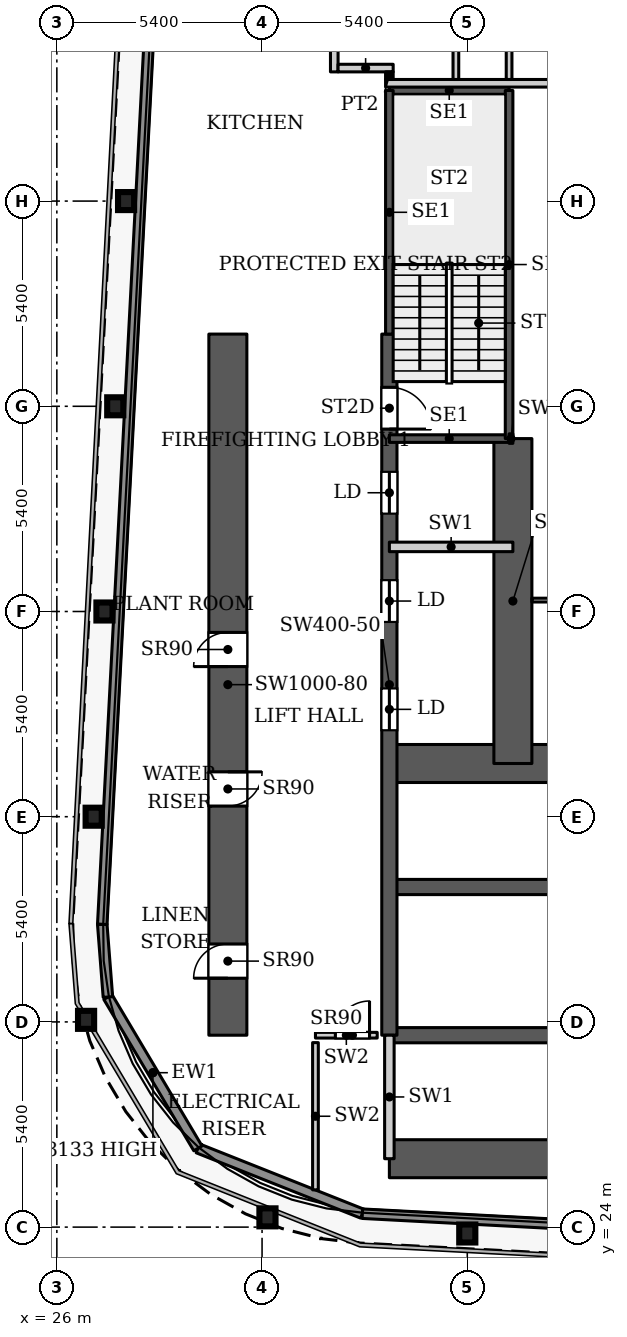
"""IFC4 building model, lengths in metres.
Left out: names, types, materials, properties, quantities, classifications, styles, units other than length and angle.
Written with IfcOpenShell. Run it as: python <this file> out.ifc"""

import sys

from ifc_helpers import new_model, si_unit, direction, frame, frame_2d, origin, origin_2d, place, context, subcontext, project, spatial, rectangle, i_section, extrude, source, transform, mapped, element, fill, save


model = new_model("IFC4")
c1 = context("Model", 3, precision=1e-05, world=origin(), true_north=direction((0.0, 1.0)))
c2 = subcontext(c1, "Body", "Model", "MODEL_VIEW")
j1 = project(units=[si_unit("LENGTHUNIT", "METRE"), si_unit("PLANEANGLEUNIT", "RADIAN")], contexts=[c1])
p1 = place(None, origin())
s1 = spatial("IfcSite", under=j1, at=p1, CompositionType="ELEMENT")
p2 = place(p1, origin())
s2 = spatial("IfcBuilding", under=s1, at=p2, CompositionType="ELEMENT")
p3 = place(p2, frame((0.0, 0.0, 53.9)))
s3 = spatial("IfcBuildingStorey", under=s2, at=p3, CompositionType="ELEMENT", Elevation=53.9)
for number, where, z_axis, x_axis in (
    (1, (36.8, 23.832, 0.0), (0.0, 0.0, 1.0), (1.0, 0.0, 0.0)),
    (2, (31.542, 24.257, 0.0), (0.0, 0.0, 1.0), (1.0, 0.0, 0.0)),
    (3, (26.769, 29.454, 0.0), (0.0, 0.0, 1.0), (1.0, 0.0, 0.0)),
    (4, (26.969, 34.8, 0.0), (0.0, 0.0, 1.0), (1.0, 0.0, 0.0)),
    (5, (27.253, 40.2, 0.0), (0.0, 0.0, 1.0), (1.0, 0.0, 0.0)),
    (6, (27.537, 45.6, 0.0), (0.0, 0.0, 1.0), (1.0, 0.0, 0.0)),
    (7, (27.822, 51.0, 0.0), (0.0, 0.0, 1.0), (1.0, 0.0, 0.0)),
):
    element("IfcColumn", number, at=place(p3, frame(where, z_axis=z_axis, x_axis=x_axis)), inside=s3, PredefinedType="COLUMN", context=c2, shape_type="SweptSolid", body=[
        extrude(i_section(OverallWidth=0.424, OverallDepth=0.474, WebThickness=0.048, FlangeThickness=0.077, FilletRadius=0.014, at=origin_2d()), origin(), (0.0, 0.0, 1.0), 3.9),
    ])
p4 = place(p3, frame((34.75, 25.8, 0.0), z_axis=(0.0, 0.0, 1.0), x_axis=(1.0, 0.0, 0.0)))
e8 = element("IfcWall", 8, at=p4, inside=s3, PredefinedType="SHEAR", context=c2, shape_type="SweptSolid", body=[
    extrude(rectangle(XDim=18.4, YDim=1.0, at=frame_2d((9.2, 0.0))), origin(), (0.0, 0.0, 1.0), 3.9),
])
p5 = place(p3, frame((34.75, 29.05, 0.0), z_axis=(0.0, 0.0, 1.0), x_axis=(1.0, 0.0, 0.0)))
e9 = element("IfcWall", 9, at=p5, inside=s3, PredefinedType="SHEAR", context=c2, shape_type="SweptSolid", body=[
    extrude(rectangle(XDim=18.4, YDim=0.4, at=frame_2d((9.2, 0.0))), origin(), (0.0, 0.0, 1.0), 3.9),
])
p6 = place(p5, frame((15.125, 0.0, 0.0)))
e10 = element("IfcOpeningElement", 10, at=p6, cuts=e9, PredefinedType="OPENING", context=c2, shape_type="SweptSolid", body=[
    extrude(rectangle(XDim=1.1, YDim=2.2, at=frame_2d((0.55, 1.1))), frame((0.0, 0.21, 0.0), z_axis=(0.0, -1.0, 0.0), x_axis=(1.0, 0.0, 0.0)), (0.0, 0.0, 1.0), 0.42),
])
p7 = place(p3, frame((34.75, 32.95, 0.0), z_axis=(0.0, 0.0, 1.0), x_axis=(1.0, 0.0, 0.0)))
e11 = element("IfcWall", 11, at=p7, inside=s3, PredefinedType="SHEAR", context=c2, shape_type="SweptSolid", body=[
    extrude(rectangle(XDim=14.25, YDim=0.4, at=frame_2d((7.125, 0.0))), origin(), (0.0, 0.0, 1.0), 3.9),
])
p8 = place(p3, frame((34.75, 36.2, 0.0), z_axis=(0.0, 0.0, 1.0), x_axis=(1.0, 0.0, 0.0)))
e12 = element("IfcWall", 12, at=p8, inside=s3, PredefinedType="SHEAR", context=c2, shape_type="SweptSolid", body=[
    extrude(rectangle(XDim=18.4, YDim=1.0, at=frame_2d((9.2, 0.0))), origin(), (0.0, 0.0, 1.0), 3.9),
])
p9 = place(p8, frame((16.9, 0.0, 0.0)))
e13 = element("IfcOpeningElement", 13, at=p9, cuts=e12, PredefinedType="OPENING", context=c2, shape_type="SweptSolid", body=[
    extrude(rectangle(XDim=1.0, YDim=2.2, at=frame_2d((0.5, 1.1))), frame((0.0, 0.51, 0.0), z_axis=(0.0, -1.0, 0.0), x_axis=(1.0, 0.0, 0.0)), (0.0, 0.0, 1.0), 1.02),
])
p10 = place(p3, frame((34.75, 29.05, 0.0), z_axis=(0.0, 0.0, 1.0), x_axis=(0.0, 1.0, 0.0)))
e14 = element("IfcWall", 14, at=p10, inside=s3, PredefinedType="SHEAR", context=c2, shape_type="SweptSolid", body=[
    extrude(rectangle(XDim=18.45, YDim=0.4, at=frame_2d((9.225, 0.0))), origin(), (0.0, 0.0, 1.0), 3.9),
])
p11 = place(p10, frame((8.025, 0.0, 0.0)))
e15 = element("IfcOpeningElement", 15, at=p11, cuts=e14, PredefinedType="OPENING", context=c2, shape_type="SweptSolid", body=[
    extrude(rectangle(XDim=1.1, YDim=2.2, at=frame_2d((0.55, 1.1))), frame((0.0, 0.21, 0.0), z_axis=(0.0, -1.0, 0.0), x_axis=(1.0, 0.0, 0.0)), (0.0, 0.0, 1.0), 0.42),
])
p12 = place(p10, frame((10.875, 0.0, 0.0)))
e16 = element("IfcOpeningElement", 16, at=p12, cuts=e14, PredefinedType="OPENING", context=c2, shape_type="SweptSolid", body=[
    extrude(rectangle(XDim=1.1, YDim=2.2, at=frame_2d((0.55, 1.1))), frame((0.0, 0.21, 0.0), z_axis=(0.0, -1.0, 0.0), x_axis=(1.0, 0.0, 0.0)), (0.0, 0.0, 1.0), 0.42),
])
p13 = place(p10, frame((13.725, 0.0, 0.0)))
e17 = element("IfcOpeningElement", 17, at=p13, cuts=e14, PredefinedType="OPENING", context=c2, shape_type="SweptSolid", body=[
    extrude(rectangle(XDim=1.1, YDim=2.2, at=frame_2d((0.55, 1.1))), frame((0.0, 0.21, 0.0), z_axis=(0.0, -1.0, 0.0), x_axis=(1.0, 0.0, 0.0)), (0.0, 0.0, 1.0), 0.42),
])
p14 = place(p10, frame((15.95, 0.0, 0.0)))
e18 = element("IfcOpeningElement", 18, at=p14, cuts=e14, PredefinedType="OPENING", context=c2, shape_type="SweptSolid", body=[
    extrude(rectangle(XDim=1.1, YDim=2.2, at=frame_2d((0.55, 1.1))), frame((0.0, 0.21, 0.0), z_axis=(0.0, -1.0, 0.0), x_axis=(1.0, 0.0, 0.0)), (0.0, 0.0, 1.0), 0.42),
])
p15 = place(p3, frame((38.0, 36.2, 0.0), z_axis=(0.0, 0.0, 1.0), x_axis=(0.0, 1.0, 0.0)))
e19 = element("IfcWall", 19, at=p15, inside=s3, PredefinedType="SHEAR", context=c2, shape_type="SweptSolid", body=[
    extrude(rectangle(XDim=8.55, YDim=1.0, at=frame_2d((4.275, 0.0))), origin(), (0.0, 0.0, 1.0), 3.9),
])
p16 = place(p3, frame((30.5, 29.05, 0.0), z_axis=(0.0, 0.0, 1.0), x_axis=(0.0, 1.0, 0.0)))
e20 = element("IfcWall", 20, at=p16, inside=s3, PredefinedType="SHEAR", context=c2, shape_type="SweptSolid", body=[
    extrude(rectangle(XDim=18.45, YDim=1.0, at=frame_2d((9.225, 0.0))), origin(), (0.0, 0.0, 1.0), 3.9),
])
p17 = place(p16, frame((1.5, 0.0, 0.0)))
e21 = element("IfcOpeningElement", 21, at=p17, cuts=e20, PredefinedType="OPENING", context=c2, shape_type="SweptSolid", body=[
    extrude(rectangle(XDim=0.9, YDim=2.2, at=frame_2d((0.45, 1.1))), frame((0.0, 0.51, 0.0), z_axis=(0.0, -1.0, 0.0), x_axis=(1.0, 0.0, 0.0)), (0.0, 0.0, 1.0), 1.02),
])
p18 = place(p16, frame((6.03, 0.0, 0.0)))
e22 = element("IfcOpeningElement", 22, at=p18, cuts=e20, PredefinedType="OPENING", context=c2, shape_type="SweptSolid", body=[
    extrude(rectangle(XDim=0.9, YDim=2.2, at=frame_2d((0.45, 1.1))), frame((0.0, 0.51, 0.0), z_axis=(0.0, -1.0, 0.0), x_axis=(1.0, 0.0, 0.0)), (0.0, 0.0, 1.0), 1.02),
])
p19 = place(p16, frame((9.7, 0.0, 0.0)))
e23 = element("IfcOpeningElement", 23, at=p19, cuts=e20, PredefinedType="OPENING", context=c2, shape_type="SweptSolid", body=[
    extrude(rectangle(XDim=0.9, YDim=2.2, at=frame_2d((0.45, 1.1))), frame((0.0, 0.51, 0.0), z_axis=(0.0, -1.0, 0.0), x_axis=(1.0, 0.0, 0.0)), (0.0, 0.0, 1.0), 1.02),
])
p20 = place(p3, frame((34.039, 24.353, 0.0), z_axis=(0.0, 0.0, 1.0), x_axis=(-0.929352825399, 0.369192803184, 0.0)))
e24 = element("IfcWall", 24, at=p20, inside=s3, PredefinedType="SOLIDWALL", context=c2, shape_type="SweptSolid", body=[
    extrude(rectangle(XDim=4.656, YDim=0.25, at=frame_2d((2.328, 0.0))), origin(), (0.0, 0.0, 1.0), 3.75),
])
p21 = place(p3, frame((29.712, 26.072, 0.0), z_axis=(0.0, 0.0, 1.0), x_axis=(-0.511028049012, 0.859564036662, 0.0)))
e25 = element("IfcWall", 25, at=p21, inside=s3, PredefinedType="SOLIDWALL", context=c2, shape_type="SweptSolid", body=[
    extrude(rectangle(XDim=4.634, YDim=0.25, at=frame_2d((2.317, 0.0))), origin(), (0.0, 0.0, 1.0), 3.133),
])
p22 = place(p3, frame((27.344, 30.055, 0.0), z_axis=(0.0, 0.0, 1.0), x_axis=(-0.077571675317, 0.99698677784, 0.0)))
e26 = element("IfcWall", 26, at=p22, inside=s3, PredefinedType="SOLIDWALL", context=c2, shape_type="SweptSolid", body=[
    extrude(rectangle(XDim=1.92, YDim=0.25, at=frame_2d((0.96, 0.0))), origin(), (0.0, 0.0, 1.0), 3.75),
])
p23 = place(p3, frame((27.195, 31.969, 0.0), z_axis=(0.0, 0.0, 1.0), x_axis=(0.052554995867, 0.998618031286, 0.0)))
e27 = element("IfcWall", 27, at=p23, inside=s3, PredefinedType="SOLIDWALL", context=c2, shape_type="SweptSolid", body=[
    extrude(rectangle(XDim=66.787, YDim=0.25, at=frame_2d((33.394, 0.0))), origin(), (0.0, 0.0, 1.0), 3.75),
])
p24 = place(p3, frame((100.586, 20.85, 0.0), z_axis=(0.0, 0.0, 1.0), x_axis=(-0.99861746497, 0.052565755559, 0.0)))
e28 = element("IfcWall", 28, at=p24, inside=s3, PredefinedType="SOLIDWALL", context=c2, shape_type="SweptSolid", body=[
    extrude(rectangle(XDim=66.639, YDim=0.25, at=frame_2d((33.319, 0.0))), origin(), (0.0, 0.0, 1.0), 3.75),
])
for number, where, z_axis, x_axis in (
    (29, (34.75, 44.75, 0.0), (0.0, 0.0, 1.0), (1.0, 0.0, 0.0)),
    (30, (34.75, 53.91, 0.0), (0.0, 0.0, 1.0), (1.0, 0.0, 0.0)),
):
    element("IfcWall", number, at=place(p3, frame(where, z_axis=z_axis, x_axis=x_axis)), inside=s3, PredefinedType="SHEAR", context=c2, shape_type="SweptSolid", body=[
        extrude(rectangle(XDim=3.15, YDim=0.2, at=frame_2d((1.575, 0.0))), origin(), (0.0, 0.0, 1.0), 3.9),
    ])
p25 = place(p3, frame((34.75, 47.5, 0.0), z_axis=(0.0, 0.0, 1.0), x_axis=(0.0, 1.0, 0.0)))
e31 = element("IfcWall", 31, at=p25, inside=s3, PredefinedType="SHEAR", context=c2, shape_type="SweptSolid", body=[
    extrude(rectangle(XDim=6.41, YDim=0.2, at=frame_2d((3.205, 0.0))), origin(), (0.0, 0.0, 1.0), 3.9),
])
p26 = place(p3, frame((37.9, 44.75, 0.0), z_axis=(0.0, 0.0, 1.0), x_axis=(0.0, 1.0, 0.0)))
e32 = element("IfcWall", 32, at=p26, inside=s3, PredefinedType="SHEAR", context=c2, shape_type="SweptSolid", body=[
    extrude(rectangle(XDim=9.16, YDim=0.2, at=frame_2d((4.58, 0.0))), origin(), (0.0, 0.0, 1.0), 3.9),
])
for number, where, z_axis, x_axis in (
    (33, (34.75, 25.8, 0.0), (0.0, 0.0, 1.0), (0.0, 1.0, 0.0)),
    (34, (34.75, 41.9, 0.0), (0.0, 0.0, 1.0), (1.0, 0.0, 0.0)),
):
    element("IfcWall", number, at=place(p3, frame(where, z_axis=z_axis, x_axis=x_axis)), inside=s3, PredefinedType="PARTITIONING", context=c2, shape_type="SweptSolid", body=[
        extrude(rectangle(XDim=3.25, YDim=0.25, at=frame_2d((1.625, 0.0))), origin(), (0.0, 0.0, 1.0), 3.9),
    ])
p27 = place(p3, frame((37.9, 44.75, 0.0), z_axis=(0.0, 0.0, 1.0), x_axis=(1.0, 0.0, 0.0)))
e35 = element("IfcWall", 35, at=p27, inside=s3, PredefinedType="PARTITIONING", context=c2, shape_type="SweptSolid", body=[
    extrude(rectangle(XDim=0.1, YDim=0.25, at=frame_2d((0.05, 0.0))), origin(), (0.0, 0.0, 1.0), 3.9),
])
p28 = place(p3, frame((32.805, 29.05, 0.0), z_axis=(0.0, 0.0, 1.0), x_axis=(1.0, 0.0, 0.0)))
e36 = element("IfcWall", 36, at=p28, inside=s3, PredefinedType="PARTITIONING", context=c2, shape_type="SweptSolid", body=[
    extrude(rectangle(XDim=1.625, YDim=0.15, at=frame_2d((0.812, 0.0))), origin(), (0.0, 0.0, 1.0), 3.9),
])
p29 = place(p28, frame((0.523, 0.0, 0.0)))
e37 = element("IfcOpeningElement", 37, at=p29, cuts=e36, PredefinedType="OPENING", context=c2, shape_type="SweptSolid", body=[
    extrude(rectangle(XDim=0.9, YDim=2.2, at=frame_2d((0.45, 1.1))), frame((0.0, 0.085, 0.0), z_axis=(0.0, -1.0, 0.0), x_axis=(1.0, 0.0, 0.0)), (0.0, 0.0, 1.0), 0.17),
])
p30 = place(p3, frame((32.805, 24.98, 0.0), z_axis=(0.0, 0.0, 1.0), x_axis=(0.0, 1.0, 0.0)))
e38 = element("IfcWall", 38, at=p30, inside=s3, PredefinedType="PARTITIONING", context=c2, shape_type="SweptSolid", body=[
    extrude(rectangle(XDim=3.875, YDim=0.15, at=frame_2d((1.938, 0.0))), origin(), (0.0, 0.0, 1.0), 3.9),
])
p31 = place(p3, frame((33.3, 54.4, 0.0), z_axis=(0.0, 0.0, 1.0), x_axis=(0.0, 1.0, 0.0)))
e39 = element("IfcWall", 39, at=p31, inside=s3, PredefinedType="PARTITIONING", context=c2, shape_type="SweptSolid", body=[
    extrude(rectangle(XDim=24.975, YDim=0.2, at=frame_2d((12.488, 0.0))), origin(), (0.0, 0.0, 1.0), 3.6),
])
p32 = place(p31, frame((10.6, 0.0, 0.0)))
e40 = element("IfcOpeningElement", 40, at=p32, cuts=e39, PredefinedType="OPENING", context=c2, shape_type="SweptSolid", body=[
    extrude(rectangle(XDim=1.0, YDim=2.1, at=frame_2d((0.5, 1.05))), frame((0.0, 0.11, 0.0), z_axis=(0.0, -1.0, 0.0), x_axis=(1.0, 0.0, 0.0)), (0.0, 0.0, 1.0), 0.22),
])
p33 = place(p31, frame((22.0, 0.0, 0.0)))
e41 = element("IfcOpeningElement", 41, at=p33, cuts=e39, PredefinedType="OPENING", context=c2, shape_type="SweptSolid", body=[
    extrude(rectangle(XDim=1.0, YDim=2.1, at=frame_2d((0.5, 1.05))), frame((0.0, 0.11, 0.0), z_axis=(0.0, -1.0, 0.0), x_axis=(1.0, 0.0, 0.0)), (0.0, 0.0, 1.0), 0.22),
])
p34 = place(p3, frame((33.4, 54.5, 0.0), z_axis=(0.0, 0.0, 1.0), x_axis=(1.0, 0.0, 0.0)))
e42 = element("IfcWall", 42, at=p34, inside=s3, PredefinedType="PARTITIONING", context=c2, shape_type="SweptSolid", body=[
    extrude(rectangle(XDim=1.45, YDim=0.2, at=frame_2d((0.725, 0.0))), origin(), (0.0, 0.0, 1.0), 3.6),
])
p35 = place(p3, frame((34.65, 54.1, 0.0), z_axis=(0.0, 0.0, 1.0), x_axis=(1.0, 0.0, 0.0)))
e43 = element("IfcWall", 43, at=p35, inside=s3, PredefinedType="PARTITIONING", context=c2, shape_type="SweptSolid", body=[
    extrude(rectangle(XDim=11.25, YDim=0.2, at=frame_2d((5.625, 0.0))), origin(), (0.0, 0.0, 1.0), 3.6),
])
p36 = place(p3, frame((34.75, 54.2, 0.0), z_axis=(0.0, 0.0, 1.0), x_axis=(0.0, 1.0, 0.0)))
e44 = element("IfcWall", 44, at=p36, inside=s3, PredefinedType="PARTITIONING", context=c2, shape_type="SweptSolid", body=[
    extrude(rectangle(XDim=0.2, YDim=0.2, at=frame_2d((0.1, 0.0))), origin(), (0.0, 0.0, 1.0), 3.6),
])
p37 = place(p3, frame((36.5, 54.2, 0.0), z_axis=(0.0, 0.0, 1.0), x_axis=(0.0, 1.0, 0.0)))
e45 = element("IfcWall", 45, at=p37, inside=s3, PredefinedType="PARTITIONING", context=c2, shape_type="SweptSolid", body=[
    extrude(rectangle(XDim=10.175, YDim=0.15, at=frame_2d((5.087, 0.0))), origin(), (0.0, 0.0, 1.0), 3.6),
])
p38 = place(p37, frame((5.8, 0.0, 0.0)))
e46 = element("IfcOpeningElement", 46, at=p38, cuts=e45, PredefinedType="OPENING", context=c2, shape_type="SweptSolid", body=[
    extrude(rectangle(XDim=0.8, YDim=2.1, at=frame_2d((0.4, 1.05))), frame((0.0, 0.085, 0.0), z_axis=(0.0, -1.0, 0.0), x_axis=(1.0, 0.0, 0.0)), (0.0, 0.0, 1.0), 0.17),
])
p39 = place(p37, frame((1.45, 0.0, 0.0)))
e47 = element("IfcOpeningElement", 47, at=p39, cuts=e45, PredefinedType="OPENING", context=c2, shape_type="SweptSolid", body=[
    extrude(rectangle(XDim=0.9, YDim=2.1, at=frame_2d((0.45, 1.05))), frame((0.0, 0.085, 0.0), z_axis=(0.0, -1.0, 0.0), x_axis=(1.0, 0.0, 0.0)), (0.0, 0.0, 1.0), 0.17),
])
p40 = place(p37, frame((8.5, 0.0, 0.0)))
e48 = element("IfcOpeningElement", 48, at=p40, cuts=e45, PredefinedType="OPENING", context=c2, shape_type="SweptSolid", body=[
    extrude(rectangle(XDim=0.8, YDim=2.1, at=frame_2d((0.4, 1.05))), frame((0.0, 0.085, 0.0), z_axis=(0.0, -1.0, 0.0), x_axis=(1.0, 0.0, 0.0)), (0.0, 0.0, 1.0), 0.17),
])
p41 = place(p3, frame((37.9, 54.2, 0.0), z_axis=(0.0, 0.0, 1.0), x_axis=(0.0, 1.0, 0.0)))
e49 = element("IfcWall", 49, at=p41, inside=s3, PredefinedType="PARTITIONING", context=c2, shape_type="SweptSolid", body=[
    extrude(rectangle(XDim=13.3, YDim=0.15, at=frame_2d((6.65, 0.0))), origin(), (0.0, 0.0, 1.0), 3.6),
])
p42 = place(p41, frame((1.25, 0.0, 0.0)))
e50 = element("IfcOpeningElement", 50, at=p42, cuts=e49, PredefinedType="OPENING", context=c2, shape_type="SweptSolid", body=[
    extrude(rectangle(XDim=0.9, YDim=2.1, at=frame_2d((0.45, 1.05))), frame((0.0, 0.085, 0.0), z_axis=(0.0, -1.0, 0.0), x_axis=(1.0, 0.0, 0.0)), (0.0, 0.0, 1.0), 0.17),
])
p43 = place(p41, frame((10.2, 0.0, 0.0)))
e51 = element("IfcOpeningElement", 51, at=p43, cuts=e49, PredefinedType="OPENING", context=c2, shape_type="SweptSolid", body=[
    extrude(rectangle(XDim=1.0, YDim=2.1, at=frame_2d((0.5, 1.05))), frame((0.0, 0.085, 0.0), z_axis=(0.0, -1.0, 0.0), x_axis=(1.0, 0.0, 0.0)), (0.0, 0.0, 1.0), 0.17),
])
p44 = place(p41, frame((4.25, 0.0, 0.0)))
e52 = element("IfcOpeningElement", 52, at=p44, cuts=e49, PredefinedType="OPENING", context=c2, shape_type="SweptSolid", body=[
    extrude(rectangle(XDim=0.9, YDim=2.1, at=frame_2d((0.45, 1.05))), frame((0.0, 0.085, 0.0), z_axis=(0.0, -1.0, 0.0), x_axis=(1.0, 0.0, 0.0)), (0.0, 0.0, 1.0), 0.17),
])
p45 = place(p3, frame((38.499, 40.5, 0.0), z_axis=(0.0, 0.0, 1.0), x_axis=(1.0, 0.0, 0.0)))
e53 = element("IfcWall", 53, at=p45, inside=s3, PredefinedType="PARTITIONING", context=c2, shape_type="SweptSolid", body=[
    extrude(rectangle(XDim=14.801, YDim=0.1, at=frame_2d((7.4, 0.0))), origin(), (0.0, 0.0, 1.0), 3.6),
])
p46 = place(p45, frame((6.701, 0.0, 0.0)))
e54 = element("IfcOpeningElement", 54, at=p46, cuts=e53, PredefinedType="OPENING", context=c2, shape_type="SweptSolid", body=[
    extrude(rectangle(XDim=1.0, YDim=2.1, at=frame_2d((0.5, 1.05))), frame((0.0, 0.06, 0.0), z_axis=(0.0, -1.0, 0.0), x_axis=(1.0, 0.0, 0.0)), (0.0, 0.0, 1.0), 0.12),
])
m1 = source(origin(), c2, "Body", "SweptSolid", [
    extrude(rectangle(XDim=1.1, YDim=2.2, at=frame_2d((0.55, 1.1))), frame((0.0, 0.025, 0.0), z_axis=(0.0, -1.0, 0.0), x_axis=(1.0, 0.0, 0.0)), (0.0, 0.0, 1.0), 0.05),
])
p47 = place(p11, origin())
e55 = element("IfcDoor", 55, at=p47, inside=s3, OperationType="SLIDING_TO_LEFT", PredefinedType="DOOR", context=c2, shape_type="MappedRepresentation", body=[
    mapped(m1, transform((0.0, 0.0, 0.0), x_axis=(1.0, 0.0, 0.0), y_axis=(0.0, 1.0, 0.0), z_axis=(0.0, 0.0, 1.0), scale=1.0)),
])
fill(e15, e55)
p48 = place(p12, origin())
e56 = element("IfcDoor", 56, at=p48, inside=s3, OperationType="SLIDING_TO_LEFT", PredefinedType="DOOR", context=c2, shape_type="MappedRepresentation", body=[
    mapped(m1, transform((0.0, 0.0, 0.0), x_axis=(1.0, 0.0, 0.0), y_axis=(0.0, 1.0, 0.0), z_axis=(0.0, 0.0, 1.0), scale=1.0)),
])
fill(e16, e56)
p49 = place(p13, origin())
e57 = element("IfcDoor", 57, at=p49, inside=s3, OperationType="SLIDING_TO_LEFT", PredefinedType="DOOR", context=c2, shape_type="MappedRepresentation", body=[
    mapped(m1, transform((0.0, 0.0, 0.0), x_axis=(1.0, 0.0, 0.0), y_axis=(0.0, 1.0, 0.0), z_axis=(0.0, 0.0, 1.0), scale=1.0)),
])
fill(e17, e57)
m2 = source(origin(), c2, "Body", "SweptSolid", [
    extrude(rectangle(XDim=0.9, YDim=2.2, at=frame_2d((0.45, 1.1))), frame((0.0, 0.025, 0.0), z_axis=(0.0, -1.0, 0.0), x_axis=(1.0, 0.0, 0.0)), (0.0, 0.0, 1.0), 0.05),
])
p50 = place(p17, origin())
e58 = element("IfcDoor", 58, at=p50, inside=s3, OperationType="SINGLE_SWING_LEFT", PredefinedType="DOOR", context=c2, shape_type="MappedRepresentation", body=[
    mapped(m2, transform((0.0, 0.0, 0.0), x_axis=(1.0, 0.0, 0.0), y_axis=(0.0, 1.0, 0.0), z_axis=(0.0, 0.0, 1.0), scale=1.0)),
])
fill(e21, e58)
p51 = place(p18, origin())
e59 = element("IfcDoor", 59, at=p51, inside=s3, OperationType="SINGLE_SWING_RIGHT", PredefinedType="DOOR", context=c2, shape_type="MappedRepresentation", body=[
    mapped(m2, transform((0.0, 0.0, 0.0), x_axis=(1.0, 0.0, 0.0), y_axis=(0.0, 1.0, 0.0), z_axis=(0.0, 0.0, 1.0), scale=1.0)),
])
fill(e22, e59)
p52 = place(p19, origin())
e60 = element("IfcDoor", 60, at=p52, inside=s3, OperationType="SINGLE_SWING_LEFT", PredefinedType="DOOR", context=c2, shape_type="MappedRepresentation", body=[
    mapped(m2, transform((0.0, 0.0, 0.0), x_axis=(1.0, 0.0, 0.0), y_axis=(0.0, 1.0, 0.0), z_axis=(0.0, 0.0, 1.0), scale=1.0)),
])
fill(e23, e60)
p53 = place(p29, origin())
e61 = element("IfcDoor", 61, at=p53, inside=s3, OperationType="SINGLE_SWING_LEFT", PredefinedType="DOOR", context=c2, shape_type="MappedRepresentation", body=[
    mapped(m2, transform((0.0, 0.0, 0.0), x_axis=(1.0, 0.0, 0.0), y_axis=(0.0, 1.0, 0.0), z_axis=(0.0, 0.0, 1.0), scale=1.0)),
])
fill(e37, e61)
m3 = source(origin(), c2, "Body", "SweptSolid", [
    extrude(rectangle(XDim=1.1, YDim=2.2, at=frame_2d((0.55, 1.1))), frame((0.0, 0.025, 0.0), z_axis=(0.0, -1.0, 0.0), x_axis=(1.0, 0.0, 0.0)), (0.0, 0.0, 1.0), 0.05),
])
p54 = place(p14, origin())
e62 = element("IfcDoor", 62, at=p54, inside=s3, OperationType="SINGLE_SWING_RIGHT", PredefinedType="DOOR", context=c2, shape_type="MappedRepresentation", body=[
    mapped(m3, transform((0.0, 0.0, 0.0), x_axis=(1.0, 0.0, 0.0), y_axis=(0.0, 1.0, 0.0), z_axis=(0.0, 0.0, 1.0), scale=1.0)),
])
fill(e18, e62)
save(model, sys.argv[1])
